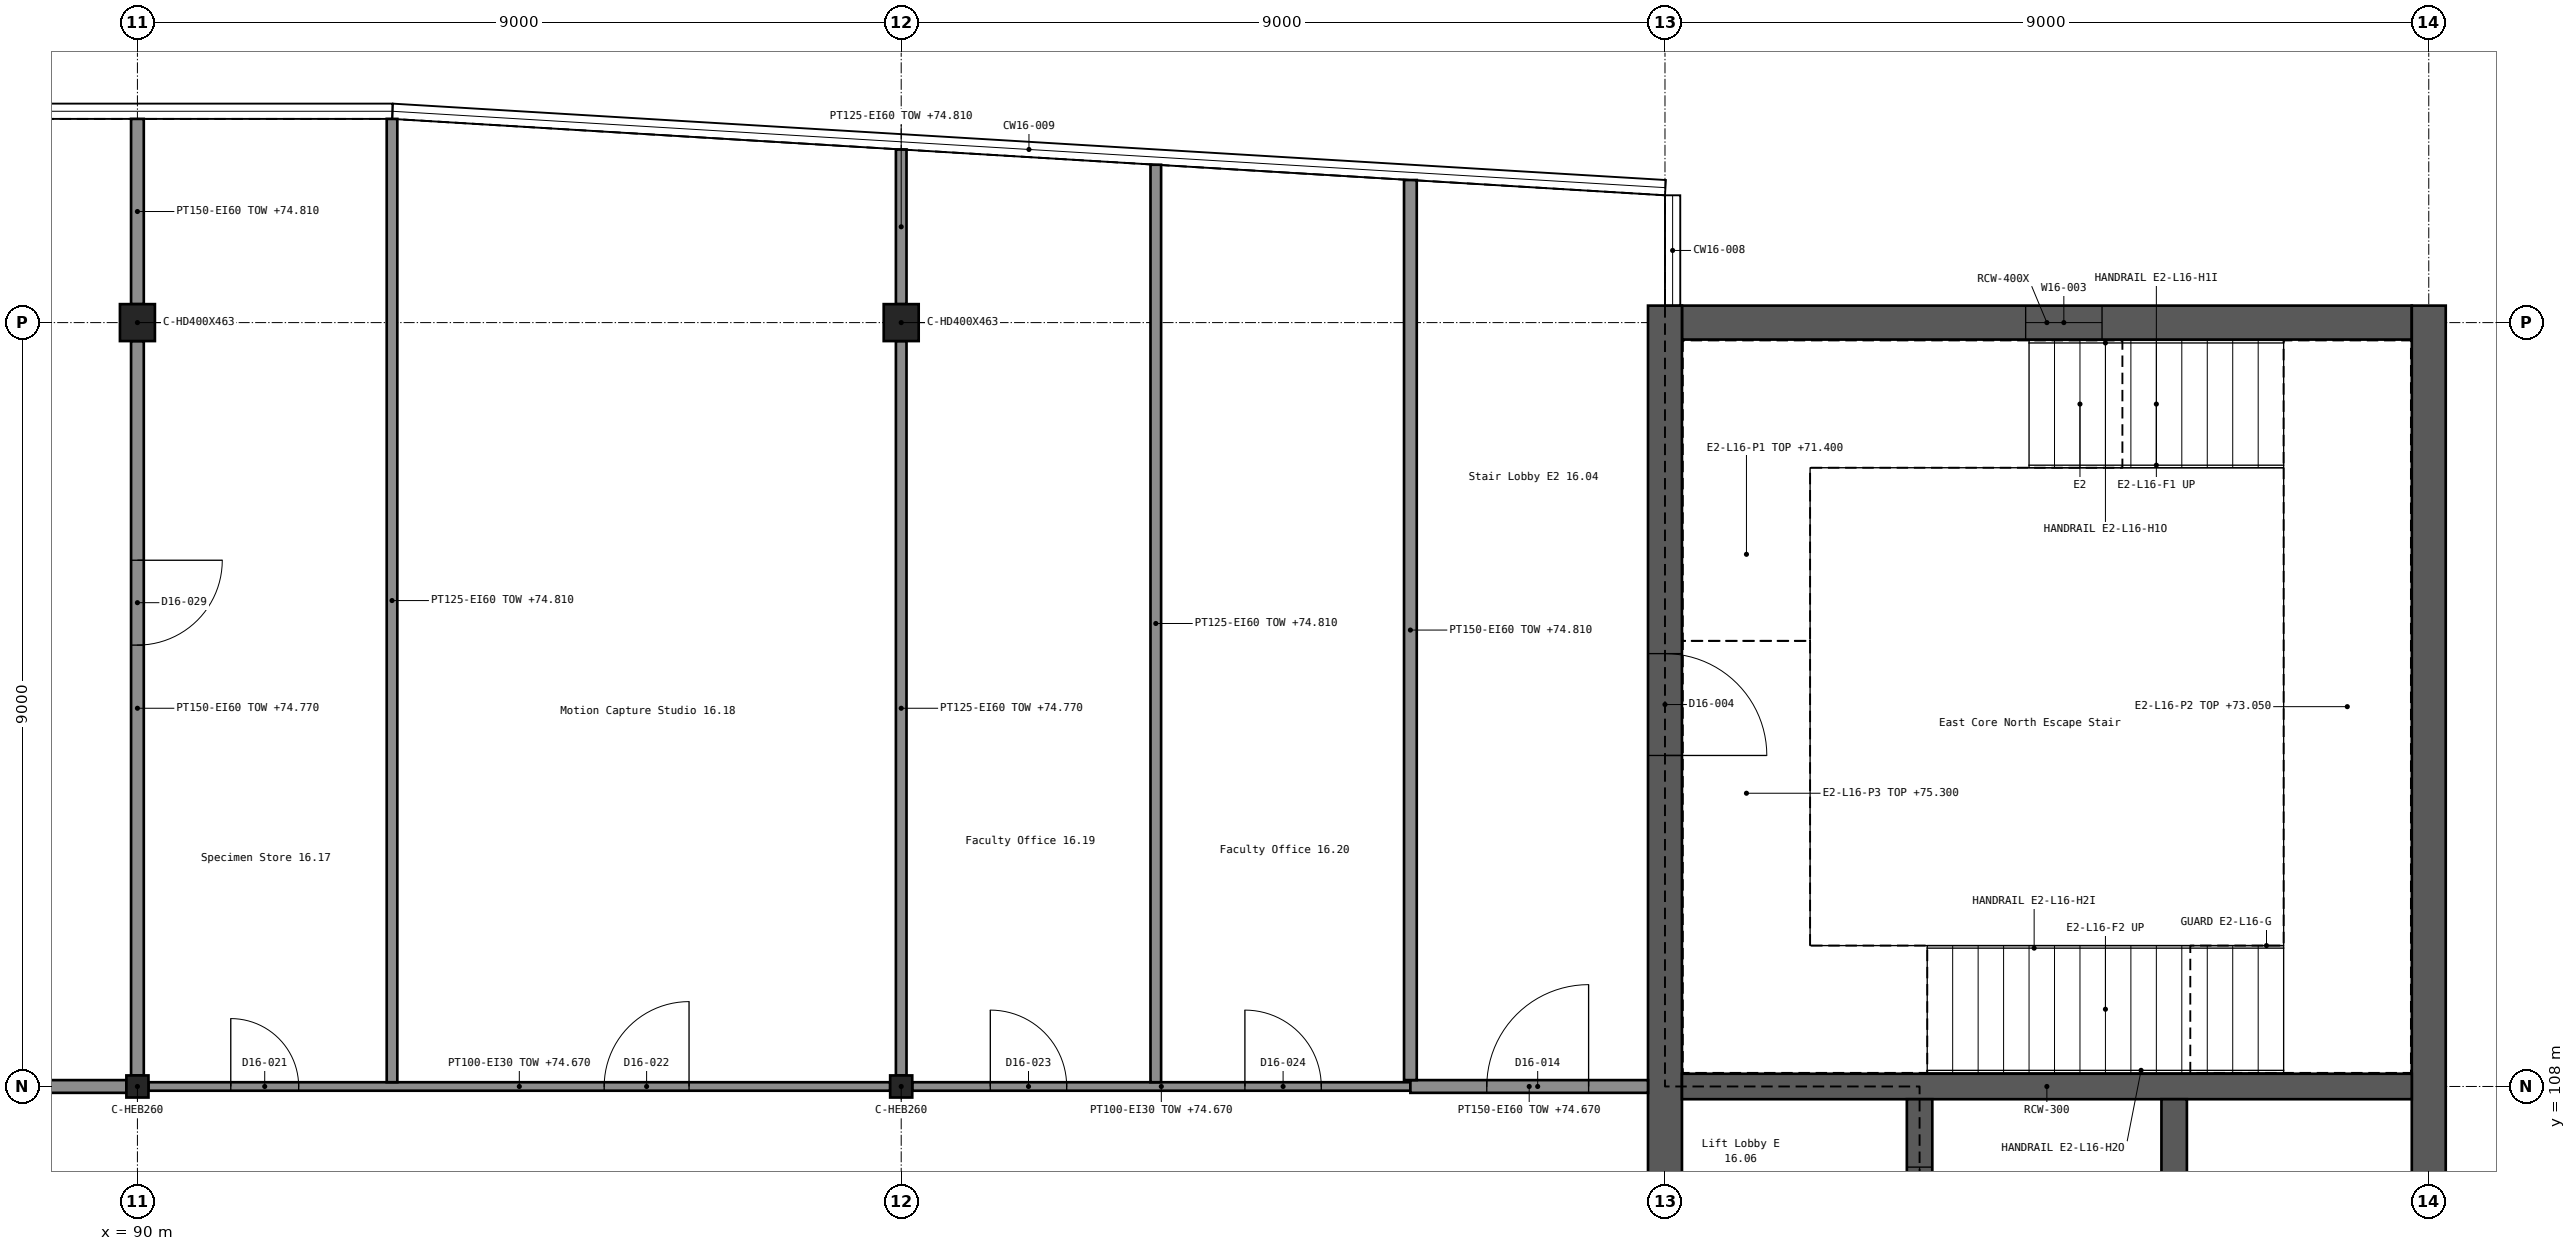
"""IFC4 building model, lengths in metres.
Left out: names, types, materials, properties, quantities, classifications, styles, units other than length and angle.
Written with IfcOpenShell. Run it as: python <this file> out.ifc"""

import sys

from ifc_helpers import new_model, si_unit, direction, frame, frame_2d, origin, origin_2d, place, context, subcontext, project, spatial, rectangle, i_section, extrude, element, fill, save


model = new_model("IFC4")
c1 = context("Model", 3, precision=1e-05, world=origin(), true_north=direction((0.0, 1.0)))
c2 = subcontext(c1, "Body", "Model", "MODEL_VIEW")
j1 = project(units=[si_unit("LENGTHUNIT", "METRE"), si_unit("PLANEANGLEUNIT", "RADIAN")], contexts=[c1])
p1 = place(None, origin())
s1 = spatial("IfcSite", under=j1, at=p1, CompositionType="ELEMENT")
p2 = place(p1, origin())
s2 = spatial("IfcBuilding", under=s1, at=p2, CompositionType="ELEMENT")
p3 = place(p2, frame((0.0, 0.0, 71.4)))
s3 = spatial("IfcBuildingStorey", under=s2, at=p3, CompositionType="ELEMENT", Elevation=71.4)
p4 = place(p3, frame((108.2, 117.0, 0.0), z_axis=(0.0, 0.0, 1.0), x_axis=(1.0, 0.0, 0.0)))
e1 = element("IfcWall", 1, at=p4, inside=s3, PredefinedType="SHEAR", context=c2, shape_type="SweptSolid", body=[
    extrude(rectangle(XDim=8.6, YDim=0.4, at=frame_2d((4.3, 0.0))), origin(), (0.0, 0.0, 1.0), 3.9),
])
p5 = place(p4, frame((4.05, 0.0, 1.2)))
e2 = element("IfcOpeningElement", 2, at=p5, cuts=e1, PredefinedType="OPENING", context=c2, shape_type="SweptSolid", body=[
    extrude(rectangle(XDim=0.9, YDim=1.5, at=frame_2d((0.45, 0.75))), frame((0.0, 0.211, 0.0), z_axis=(0.0, -1.0, 0.0), x_axis=(1.0, 0.0, 0.0)), (0.0, 0.0, 1.0), 0.422),
])
p6 = place(p3, frame((108.0, 89.8, 0.0), z_axis=(0.0, 0.0, 1.0), x_axis=(0.0, 1.0, 0.0)))
e3 = element("IfcWall", 3, at=p6, inside=s3, PredefinedType="SHEAR", context=c2, shape_type="SweptSolid", body=[
    extrude(rectangle(XDim=27.4, YDim=0.4, at=frame_2d((13.7, 0.0))), origin(), (0.0, 0.0, 1.0), 3.9),
])
p7 = place(p6, frame((4.1, 0.0, 0.0)))
e4 = element("IfcOpeningElement", 4, at=p7, cuts=e3, PredefinedType="OPENING", context=c2, shape_type="SweptSolid", body=[
    extrude(rectangle(XDim=1.2, YDim=2.1, at=frame_2d((0.6, 1.05))), frame((0.0, 0.211, 0.0), z_axis=(0.0, -1.0, 0.0), x_axis=(1.0, 0.0, 0.0)), (0.0, 0.0, 1.0), 0.422),
])
p8 = place(p6, frame((22.1, 0.0, 0.0)))
e5 = element("IfcOpeningElement", 5, at=p8, cuts=e3, PredefinedType="OPENING", context=c2, shape_type="SweptSolid", body=[
    extrude(rectangle(XDim=1.2, YDim=2.1, at=frame_2d((0.6, 1.05))), frame((0.0, 0.211, 0.0), z_axis=(0.0, -1.0, 0.0), x_axis=(1.0, 0.0, 0.0)), (0.0, 0.0, 1.0), 0.422),
])
p9 = place(p6, frame((12.5, 0.0, 0.0)))
e6 = element("IfcOpeningElement", 6, at=p9, cuts=e3, PredefinedType="OPENING", context=c2, shape_type="SweptSolid", body=[
    extrude(rectangle(XDim=2.0, YDim=2.1, at=frame_2d((1.0, 1.05))), frame((0.0, 0.211, 0.0), z_axis=(0.0, -1.0, 0.0), x_axis=(1.0, 0.0, 0.0)), (0.0, 0.0, 1.0), 0.422),
])
p10 = place(p3, frame((117.0, 89.8, 0.0), z_axis=(0.0, 0.0, 1.0), x_axis=(0.0, 1.0, 0.0)))
e7 = element("IfcWall", 7, at=p10, inside=s3, PredefinedType="SHEAR", context=c2, shape_type="SweptSolid", body=[
    extrude(rectangle(XDim=27.4, YDim=0.4, at=frame_2d((13.7, 0.0))), origin(), (0.0, 0.0, 1.0), 3.9),
])
p11 = place(p3, frame((108.2, 108.0, 0.0), z_axis=(0.0, 0.0, 1.0), x_axis=(1.0, 0.0, 0.0)))
e8 = element("IfcWall", 8, at=p11, inside=s3, PredefinedType="SHEAR", context=c2, shape_type="SweptSolid", body=[
    extrude(rectangle(XDim=8.6, YDim=0.3, at=frame_2d((4.3, 0.0))), origin(), (0.0, 0.0, 1.0), 3.9),
])
p12 = place(p3, frame((111.0, 99.15, 0.0), z_axis=(0.0, 0.0, 1.0), x_axis=(0.0, 1.0, 0.0)))
e9 = element("IfcWall", 9, at=p12, inside=s3, PredefinedType="SHEAR", context=c2, shape_type="SweptSolid", body=[
    extrude(rectangle(XDim=8.7, YDim=0.3, at=frame_2d((4.35, 0.0))), origin(), (0.0, 0.0, 1.0), 3.9),
])
p13 = place(p12, frame((0.8, 0.0, 0.0)))
e10 = element("IfcOpeningElement", 10, at=p13, cuts=e9, PredefinedType="OPENING", context=c2, shape_type="SweptSolid", body=[
    extrude(rectangle(XDim=1.1, YDim=2.1, at=frame_2d((0.55, 1.05))), frame((0.0, 0.161, 0.0), z_axis=(0.0, -1.0, 0.0), x_axis=(1.0, 0.0, 0.0)), (0.0, 0.0, 1.0), 0.322),
])
p14 = place(p12, frame((3.8, 0.0, 0.0)))
e11 = element("IfcOpeningElement", 11, at=p14, cuts=e9, PredefinedType="OPENING", context=c2, shape_type="SweptSolid", body=[
    extrude(rectangle(XDim=1.1, YDim=2.1, at=frame_2d((0.55, 1.05))), frame((0.0, 0.161, 0.0), z_axis=(0.0, -1.0, 0.0), x_axis=(1.0, 0.0, 0.0)), (0.0, 0.0, 1.0), 0.322),
])
p15 = place(p12, frame((6.8, 0.0, 0.0)))
e12 = element("IfcOpeningElement", 12, at=p15, cuts=e9, PredefinedType="OPENING", context=c2, shape_type="SweptSolid", body=[
    extrude(rectangle(XDim=1.1, YDim=2.1, at=frame_2d((0.55, 1.05))), frame((0.0, 0.161, 0.0), z_axis=(0.0, -1.0, 0.0), x_axis=(1.0, 0.0, 0.0)), (0.0, 0.0, 1.0), 0.322),
])
p16 = place(p3, frame((114.0, 99.15, 0.0), z_axis=(0.0, 0.0, 1.0), x_axis=(0.0, 1.0, 0.0)))
e13 = element("IfcWall", 13, at=p16, inside=s3, PredefinedType="SHEAR", context=c2, shape_type="SweptSolid", body=[
    extrude(rectangle(XDim=8.7, YDim=0.3, at=frame_2d((4.35, 0.0))), origin(), (0.0, 0.0, 1.0), 3.9),
])
for number, where, z_axis, x_axis in (
    (14, (90.0, 108.0, 0.0), (0.0, 0.0, 1.0), (1.0, 0.0, 0.0)),
    (15, (99.0, 108.0, 0.0), (0.0, 0.0, 1.0), (1.0, 0.0, 0.0)),
):
    element("IfcColumn", number, at=place(p3, frame(where, z_axis=z_axis, x_axis=x_axis)), inside=s3, PredefinedType="COLUMN", context=c2, shape_type="SweptSolid", body=[
        extrude(i_section(OverallWidth=0.26, OverallDepth=0.26, WebThickness=0.01, FlangeThickness=0.018, FilletRadius=0.024, at=origin_2d()), origin(), (0.0, 0.0, 1.0), 3.9),
    ])
for number, where, z_axis, x_axis in (
    (16, (90.0, 117.0, 0.0), (0.0, 0.0, 1.0), (1.0, 0.0, 0.0)),
    (17, (99.0, 117.0, 0.0), (0.0, 0.0, 1.0), (1.0, 0.0, 0.0)),
):
    element("IfcColumn", number, at=place(p3, frame(where, z_axis=z_axis, x_axis=x_axis)), inside=s3, PredefinedType="COLUMN", context=c2, shape_type="SweptSolid", body=[
        extrude(i_section(OverallWidth=0.412, OverallDepth=0.435, WebThickness=0.036, FlangeThickness=0.057, FilletRadius=0.015, at=origin_2d()), origin(), (0.0, 0.0, 1.0), 3.9),
    ])
p17 = place(p3, frame((90.13, 108.0, 0.0), z_axis=(0.0, 0.0, 1.0), x_axis=(1.0, 0.0, 0.0)))
e18 = element("IfcWall", 18, at=p17, inside=s3, PredefinedType="PARTITIONING", context=c2, shape_type="SweptSolid", body=[
    extrude(rectangle(XDim=8.74, YDim=0.1, at=frame_2d((4.37, 0.0))), origin(), (0.0, 0.0, 1.0), 3.27),
])
p18 = place(p17, frame((0.97, 0.0, 0.0)))
e19 = element("IfcOpeningElement", 19, at=p18, cuts=e18, PredefinedType="OPENING", context=c2, shape_type="SweptSolid", body=[
    extrude(rectangle(XDim=0.8, YDim=2.1, at=frame_2d((0.4, 1.05))), frame((0.0, 0.061, 0.0), z_axis=(0.0, -1.0, 0.0), x_axis=(1.0, 0.0, 0.0)), (0.0, 0.0, 1.0), 0.122),
])
p19 = place(p17, frame((5.37, 0.0, 0.0)))
e20 = element("IfcOpeningElement", 20, at=p19, cuts=e18, PredefinedType="OPENING", context=c2, shape_type="SweptSolid", body=[
    extrude(rectangle(XDim=1.0, YDim=2.1, at=frame_2d((0.5, 1.05))), frame((0.0, 0.061, 0.0), z_axis=(0.0, -1.0, 0.0), x_axis=(1.0, 0.0, 0.0)), (0.0, 0.0, 1.0), 0.122),
])
p20 = place(p3, frame((99.13, 108.0, 0.0), z_axis=(0.0, 0.0, 1.0), x_axis=(1.0, 0.0, 0.0)))
e21 = element("IfcWall", 21, at=p20, inside=s3, PredefinedType="PARTITIONING", context=c2, shape_type="SweptSolid", body=[
    extrude(rectangle(XDim=5.87, YDim=0.1, at=frame_2d((2.935, 0.0))), origin(), (0.0, 0.0, 1.0), 3.27),
])
p21 = place(p20, frame((0.92, 0.0, 0.0)))
e22 = element("IfcOpeningElement", 22, at=p21, cuts=e21, PredefinedType="OPENING", context=c2, shape_type="SweptSolid", body=[
    extrude(rectangle(XDim=0.9, YDim=2.1, at=frame_2d((0.45, 1.05))), frame((0.0, 0.061, 0.0), z_axis=(0.0, -1.0, 0.0), x_axis=(1.0, 0.0, 0.0)), (0.0, 0.0, 1.0), 0.122),
])
p22 = place(p20, frame((3.92, 0.0, 0.0)))
e23 = element("IfcOpeningElement", 23, at=p22, cuts=e21, PredefinedType="OPENING", context=c2, shape_type="SweptSolid", body=[
    extrude(rectangle(XDim=0.9, YDim=2.1, at=frame_2d((0.45, 1.05))), frame((0.0, 0.061, 0.0), z_axis=(0.0, -1.0, 0.0), x_axis=(1.0, 0.0, 0.0)), (0.0, 0.0, 1.0), 0.122),
])
p23 = place(p3, frame((81.13, 108.0, 0.0), z_axis=(0.0, 0.0, 1.0), x_axis=(1.0, 0.0, 0.0)))
e24 = element("IfcWall", 24, at=p23, inside=s3, PredefinedType="PARTITIONING", context=c2, shape_type="SweptSolid", body=[
    extrude(rectangle(XDim=8.74, YDim=0.15, at=frame_2d((4.37, 0.0))), origin(), (0.0, 0.0, 1.0), 3.27),
])
p24 = place(p23, frame((6.195, 0.0, 0.0)))
e25 = element("IfcOpeningElement", 25, at=p24, cuts=e24, PredefinedType="OPENING", context=c2, shape_type="SweptSolid", body=[
    extrude(rectangle(XDim=1.1, YDim=2.4, at=frame_2d((0.55, 1.2))), frame((0.0, 0.086, 0.0), z_axis=(0.0, -1.0, 0.0), x_axis=(1.0, 0.0, 0.0)), (0.0, 0.0, 1.0), 0.172),
])
p25 = place(p3, frame((105.0, 108.0, 0.0), z_axis=(0.0, 0.0, 1.0), x_axis=(1.0, 0.0, 0.0)))
e26 = element("IfcWall", 26, at=p25, inside=s3, PredefinedType="PARTITIONING", context=c2, shape_type="SweptSolid", body=[
    extrude(rectangle(XDim=2.8, YDim=0.15, at=frame_2d((1.4, 0.0))), origin(), (0.0, 0.0, 1.0), 3.27),
])
p26 = place(p25, frame((0.9, 0.0, 0.0)))
e27 = element("IfcOpeningElement", 27, at=p26, cuts=e26, PredefinedType="OPENING", context=c2, shape_type="SweptSolid", body=[
    extrude(rectangle(XDim=1.2, YDim=2.1, at=frame_2d((0.6, 1.05))), frame((0.0, 0.086, 0.0), z_axis=(0.0, -1.0, 0.0), x_axis=(1.0, 0.0, 0.0)), (0.0, 0.0, 1.0), 0.172),
])
p27 = place(p3, frame((90.0, 108.13, 0.0), z_axis=(0.0, 0.0, 1.0), x_axis=(0.0, 1.0, 0.0)))
e28 = element("IfcWall", 28, at=p27, inside=s3, PredefinedType="PARTITIONING", context=c2, shape_type="SweptSolid", body=[
    extrude(rectangle(XDim=8.653, YDim=0.15, at=frame_2d((4.326, 0.0))), origin(), (0.0, 0.0, 1.0), 3.37),
])
p28 = place(p27, frame((5.07, 0.0, 0.0)))
e29 = element("IfcOpeningElement", 29, at=p28, cuts=e28, PredefinedType="OPENING", context=c2, shape_type="SweptSolid", body=[
    extrude(rectangle(XDim=1.0, YDim=2.1, at=frame_2d((0.5, 1.05))), frame((0.0, 0.086, 0.0), z_axis=(0.0, -1.0, 0.0), x_axis=(1.0, 0.0, 0.0)), (0.0, 0.0, 1.0), 0.172),
])
p29 = place(p3, frame((90.0, 117.218, 0.0), z_axis=(0.0, 0.0, 1.0), x_axis=(0.0, 1.0, 0.0)))
e30 = element("IfcWall", 30, at=p29, inside=s3, PredefinedType="PARTITIONING", context=c2, shape_type="SweptSolid", body=[
    extrude(rectangle(XDim=2.182, YDim=0.15, at=frame_2d((1.091, 0.0))), origin(), (0.0, 0.0, 1.0), 3.41),
])
p30 = place(p3, frame((93.0, 108.05, 0.0), z_axis=(0.0, 0.0, 1.0), x_axis=(0.0, 1.0, 0.0)))
e31 = element("IfcWall", 31, at=p30, inside=s3, PredefinedType="PARTITIONING", context=c2, shape_type="SweptSolid", body=[
    extrude(rectangle(XDim=11.35, YDim=0.125, at=frame_2d((5.675, 0.0))), origin(), (0.0, 0.0, 1.0), 3.41),
])
p31 = place(p3, frame((99.0, 108.13, 0.0), z_axis=(0.0, 0.0, 1.0), x_axis=(0.0, 1.0, 0.0)))
e32 = element("IfcWall", 32, at=p31, inside=s3, PredefinedType="PARTITIONING", context=c2, shape_type="SweptSolid", body=[
    extrude(rectangle(XDim=8.653, YDim=0.125, at=frame_2d((4.326, 0.0))), origin(), (0.0, 0.0, 1.0), 3.37),
])
p32 = place(p3, frame((99.0, 117.218, 0.0), z_axis=(0.0, 0.0, 1.0), x_axis=(0.0, 1.0, 0.0)))
e33 = element("IfcWall", 33, at=p32, inside=s3, PredefinedType="PARTITIONING", context=c2, shape_type="SweptSolid", body=[
    extrude(rectangle(XDim=1.823, YDim=0.125, at=frame_2d((0.911, 0.0))), origin(), (0.0, 0.0, 1.0), 3.41),
])
p33 = place(p3, frame((102.0, 108.05, 0.0), z_axis=(0.0, 0.0, 1.0), x_axis=(0.0, 1.0, 0.0)))
e34 = element("IfcWall", 34, at=p33, inside=s3, PredefinedType="PARTITIONING", context=c2, shape_type="SweptSolid", body=[
    extrude(rectangle(XDim=10.81, YDim=0.125, at=frame_2d((5.405, 0.0))), origin(), (0.0, 0.0, 1.0), 3.41),
])
p34 = place(p3, frame((105.0, 108.075, 0.0), z_axis=(0.0, 0.0, 1.0), x_axis=(0.0, 1.0, 0.0)))
e35 = element("IfcWall", 35, at=p34, inside=s3, PredefinedType="PARTITIONING", context=c2, shape_type="SweptSolid", body=[
    extrude(rectangle(XDim=10.605, YDim=0.15, at=frame_2d((5.302, 0.0))), origin(), (0.0, 0.0, 1.0), 3.41),
])
p35 = place(p5, origin())
e36 = element("IfcWindow", 36, at=p35, inside=s3, PartitioningType="SINGLE_PANEL", PredefinedType="WINDOW", context=c2, shape_type="SweptSolid", body=[
    extrude(rectangle(XDim=0.9, YDim=1.5, at=frame_2d((0.45, 0.75))), frame((0.0, 0.03, 0.0), z_axis=(0.0, -1.0, 0.0), x_axis=(1.0, 0.0, 0.0)), (0.0, 0.0, 1.0), 0.06),
])
fill(e2, e36)
p36 = place(p8, frame((1.2, 0.0, 0.0), z_axis=(0.0, 0.0, 1.0), x_axis=(-1.0, 0.0, 0.0)))
e37 = element("IfcDoor", 37, at=p36, inside=s3, OperationType="SINGLE_SWING_RIGHT", PredefinedType="DOOR", context=c2, shape_type="SweptSolid", body=[
    extrude(rectangle(XDim=1.2, YDim=2.1, at=frame_2d((0.6, 1.05))), frame((0.0, 0.025, 0.0), z_axis=(0.0, -1.0, 0.0), x_axis=(1.0, 0.0, 0.0)), (0.0, 0.0, 1.0), 0.05),
])
fill(e5, e37)
p37 = place(p15, origin())
e38 = element("IfcDoor", 38, at=p37, inside=s3, OperationType="DOUBLE_DOOR_SLIDING", PredefinedType="DOOR", context=c2, shape_type="SweptSolid", body=[
    extrude(rectangle(XDim=1.1, YDim=2.1, at=frame_2d((0.55, 1.05))), frame((0.0, 0.025, 0.0), z_axis=(0.0, -1.0, 0.0), x_axis=(1.0, 0.0, 0.0)), (0.0, 0.0, 1.0), 0.05),
])
fill(e12, e38)
p38 = place(p26, origin())
e39 = element("IfcDoor", 39, at=p38, inside=s3, OperationType="SINGLE_SWING_RIGHT", PredefinedType="DOOR", context=c2, shape_type="SweptSolid", body=[
    extrude(rectangle(XDim=1.2, YDim=2.1, at=frame_2d((0.6, 1.05))), frame((0.0, 0.025, 0.0), z_axis=(0.0, -1.0, 0.0), x_axis=(1.0, 0.0, 0.0)), (0.0, 0.0, 1.0), 0.05),
])
fill(e27, e39)
p39 = place(p18, origin())
e40 = element("IfcDoor", 40, at=p39, inside=s3, OperationType="SINGLE_SWING_LEFT", PredefinedType="DOOR", context=c2, shape_type="SweptSolid", body=[
    extrude(rectangle(XDim=0.8, YDim=2.1, at=frame_2d((0.4, 1.05))), frame((0.0, 0.025, 0.0), z_axis=(0.0, -1.0, 0.0), x_axis=(1.0, 0.0, 0.0)), (0.0, 0.0, 1.0), 0.05),
])
fill(e19, e40)
p40 = place(p19, origin())
e41 = element("IfcDoor", 41, at=p40, inside=s3, OperationType="SINGLE_SWING_RIGHT", PredefinedType="DOOR", context=c2, shape_type="SweptSolid", body=[
    extrude(rectangle(XDim=1.0, YDim=2.1, at=frame_2d((0.5, 1.05))), frame((0.0, 0.025, 0.0), z_axis=(0.0, -1.0, 0.0), x_axis=(1.0, 0.0, 0.0)), (0.0, 0.0, 1.0), 0.05),
])
fill(e20, e41)
p41 = place(p21, origin())
e42 = element("IfcDoor", 42, at=p41, inside=s3, OperationType="SINGLE_SWING_LEFT", PredefinedType="DOOR", context=c2, shape_type="SweptSolid", body=[
    extrude(rectangle(XDim=0.9, YDim=2.1, at=frame_2d((0.45, 1.05))), frame((0.0, 0.025, 0.0), z_axis=(0.0, -1.0, 0.0), x_axis=(1.0, 0.0, 0.0)), (0.0, 0.0, 1.0), 0.05),
])
fill(e22, e42)
p42 = place(p22, origin())
e43 = element("IfcDoor", 43, at=p42, inside=s3, OperationType="SINGLE_SWING_LEFT", PredefinedType="DOOR", context=c2, shape_type="SweptSolid", body=[
    extrude(rectangle(XDim=0.9, YDim=2.1, at=frame_2d((0.45, 1.05))), frame((0.0, 0.025, 0.0), z_axis=(0.0, -1.0, 0.0), x_axis=(1.0, 0.0, 0.0)), (0.0, 0.0, 1.0), 0.05),
])
fill(e23, e43)
p43 = place(p28, frame((1.0, 0.0, 0.0), z_axis=(0.0, 0.0, 1.0), x_axis=(-1.0, 0.0, 0.0)))
e44 = element("IfcDoor", 44, at=p43, inside=s3, OperationType="SINGLE_SWING_LEFT", PredefinedType="DOOR", context=c2, shape_type="SweptSolid", body=[
    extrude(rectangle(XDim=1.0, YDim=2.1, at=frame_2d((0.5, 1.05))), frame((0.0, 0.025, 0.0), z_axis=(0.0, -1.0, 0.0), x_axis=(1.0, 0.0, 0.0)), (0.0, 0.0, 1.0), 0.05),
])
fill(e29, e44)
save(model, sys.argv[1])
